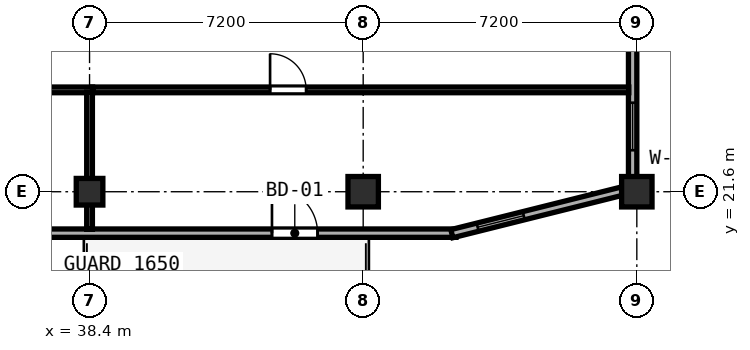
"""IFC4 building model, lengths in metres.
Left out: names, types, materials, properties, quantities, classifications, styles, units other than length and angle.
Written with IfcOpenShell. Run it as: python <this file> out.ifc"""

import sys

from ifc_helpers import new_model, si_unit, direction, frame, frame_2d, origin, origin_2d, place, context, subcontext, project, spatial, rectangle, hollow_rectangle, extrude, element, fill, save


model = new_model("IFC4")
c1 = context("Model", 3, precision=1e-05, world=origin(), true_north=direction((0.0, 1.0)))
c2 = subcontext(c1, "Body", "Model", "MODEL_VIEW")
j1 = project(units=[si_unit("LENGTHUNIT", "METRE"), si_unit("PLANEANGLEUNIT", "RADIAN")], contexts=[c1])
p1 = place(None, origin())
s1 = spatial("IfcSite", under=j1, at=p1, CompositionType="ELEMENT")
p2 = place(p1, origin())
s2 = spatial("IfcBuilding", under=s1, at=p2, CompositionType="ELEMENT")
p3 = place(p2, frame((0.0, 0.0, 269.85)))
s3 = spatial("IfcBuildingStorey", under=s2, at=p3, CompositionType="ELEMENT", Elevation=269.85)
for number, where, z_axis, x_axis in (
    (1, (52.8, 21.6, 0.0), (0.0, 0.0, 1.0), (1.0, 0.0, 0.0)),
    (2, (45.6, 21.6, 0.0), (0.0, 0.0, 1.0), (1.0, 0.0, 0.0)),
):
    element("IfcColumn", number, at=place(p3, frame(where, z_axis=z_axis, x_axis=x_axis)), inside=s3, PredefinedType="COLUMN", context=c2, shape_type="SweptSolid", body=[
        extrude(hollow_rectangle(XDim=0.8, YDim=0.8, WallThickness=0.03, at=origin_2d()), origin(), (0.0, 0.0, 1.0), 3.85),
    ])
p4 = place(p3, frame((38.4, 21.6, 0.0), z_axis=(0.0, 0.0, 1.0), x_axis=(1.0, 0.0, 0.0)))
e3 = element("IfcColumn", 3, at=p4, inside=s3, PredefinedType="COLUMN", context=c2, shape_type="SweptSolid", body=[
    extrude(hollow_rectangle(XDim=0.7, YDim=0.7, WallThickness=0.026, at=origin_2d()), origin(), (0.0, 0.0, 1.0), 3.85),
])
p5 = place(p3, frame((28.759, 20.51, 0.0), z_axis=(0.0, 0.0, 1.0), x_axis=(1.0, 0.0, 0.0)))
e4 = element("IfcWall", 4, at=p5, inside=s3, PredefinedType="SOLIDWALL", context=c2, shape_type="SweptSolid", body=[
    extrude(rectangle(XDim=19.283, YDim=0.22, at=frame_2d((9.642, 0.0))), origin(), (0.0, 0.0, 1.0), 3.67),
])
p6 = place(p5, frame((15.641, 0.0, 0.0), z_axis=(0.0, 0.0, 1.0), x_axis=(-1.0, 0.0, 0.0)))
e5 = element("IfcOpeningElement", 5, at=p6, cuts=e4, PredefinedType="OPENING", context=c2, shape_type="SweptSolid", body=[
    extrude(rectangle(XDim=1.2, YDim=2.15, at=frame_2d((0.6, 1.075))), frame((0.0, 0.12, 0.0), z_axis=(0.0, -1.0, 0.0), x_axis=(1.0, 0.0, 0.0)), (0.0, 0.0, 1.0), 0.24),
])
p7 = place(p3, frame((47.933, 20.497, 0.0), z_axis=(0.0, 0.0, 1.0), x_axis=(0.970133159038, 0.242572986408, 0.0)))
e6 = element("IfcWall", 6, at=p7, inside=s3, PredefinedType="SOLIDWALL", context=c2, shape_type="SweptSolid", body=[
    extrude(rectangle(XDim=4.613, YDim=0.22, at=frame_2d((2.306, 0.0))), origin(), (0.0, 0.0, 1.0), 3.315),
])
p8 = place(p7, frame((0.7, 0.0, 0.85)))
e7 = element("IfcOpeningElement", 7, at=p8, cuts=e6, PredefinedType="OPENING", context=c2, shape_type="SweptSolid", body=[
    extrude(rectangle(XDim=1.25, YDim=1.95, at=frame_2d((0.625, 0.975))), frame((0.0, 0.12, 0.0), z_axis=(0.0, -1.0, 0.0), x_axis=(1.0, 0.0, 0.0)), (0.0, 0.0, 1.0), 0.24),
])
p9 = place(p3, frame((52.69, 21.992, 0.0), z_axis=(0.0, 0.0, 1.0), x_axis=(0.0, 1.0, 0.0)))
e8 = element("IfcWall", 8, at=p9, inside=s3, PredefinedType="SOLIDWALL", context=c2, shape_type="SweptSolid", body=[
    extrude(rectangle(XDim=5.266, YDim=0.22, at=frame_2d((2.633, 0.0))), origin(), (0.0, 0.0, 1.0), 3.315),
])
p10 = place(p9, frame((0.7, 0.0, 0.85)))
e9 = element("IfcOpeningElement", 9, at=p10, cuts=e8, PredefinedType="OPENING", context=c2, shape_type="SweptSolid", body=[
    extrude(rectangle(XDim=1.25, YDim=1.95, at=frame_2d((0.625, 0.975))), frame((0.0, 0.12, 0.0), z_axis=(0.0, -1.0, 0.0), x_axis=(1.0, 0.0, 0.0)), (0.0, 0.0, 1.0), 0.24),
])
p11 = place(p3, frame((31.282, 24.28, 0.0), z_axis=(0.0, 0.0, 1.0), x_axis=(1.0, 0.0, 0.0)))
e10 = element("IfcWall", 10, at=p11, inside=s3, PredefinedType="PARTITIONING", context=c2, shape_type="SweptSolid", body=[
    extrude(rectangle(XDim=7.198, YDim=0.15, at=frame_2d((3.599, 0.0))), origin(), (0.0, 0.0, 1.0), 3.67),
])
p12 = place(p11, frame((3.913, 0.0, 0.0), z_axis=(0.0, 0.0, 1.0), x_axis=(-1.0, 0.0, 0.0)))
e11 = element("IfcOpeningElement", 11, at=p12, cuts=e10, PredefinedType="OPENING", context=c2, shape_type="SweptSolid", body=[
    extrude(rectangle(XDim=0.95, YDim=2.12, at=frame_2d((0.475, 1.06))), frame((0.0, 0.085, 0.0), z_axis=(0.0, -1.0, 0.0), x_axis=(1.0, 0.0, 0.0)), (0.0, 0.0, 1.0), 0.17),
])
p13 = place(p3, frame((38.4, 20.612, 0.0), z_axis=(0.0, 0.0, 1.0), x_axis=(0.0, 1.0, 0.0)))
e12 = element("IfcWall", 12, at=p13, inside=s3, PredefinedType="PARTITIONING", context=c2, shape_type="SweptSolid", body=[
    extrude(rectangle(XDim=3.608, YDim=0.15, at=frame_2d((1.804, 0.0))), origin(), (0.0, 0.0, 1.0), 3.155),
])
p14 = place(p3, frame((38.482, 24.28, 0.0), z_axis=(0.0, 0.0, 1.0), x_axis=(1.0, 0.0, 0.0)))
e13 = element("IfcWall", 13, at=p14, inside=s3, PredefinedType="PARTITIONING", context=c2, shape_type="SweptSolid", body=[
    extrude(rectangle(XDim=14.106, YDim=0.15, at=frame_2d((7.053, 0.0))), origin(), (0.0, 0.0, 1.0), 3.67),
])
p15 = place(p14, frame((5.618, 0.0, 0.0), z_axis=(0.0, 0.0, 1.0), x_axis=(-1.0, 0.0, 0.0)))
e14 = element("IfcOpeningElement", 14, at=p15, cuts=e13, PredefinedType="OPENING", context=c2, shape_type="SweptSolid", body=[
    extrude(rectangle(XDim=0.95, YDim=2.12, at=frame_2d((0.475, 1.06))), frame((0.0, 0.085, 0.0), z_axis=(0.0, -1.0, 0.0), x_axis=(1.0, 0.0, 0.0)), (0.0, 0.0, 1.0), 0.17),
])
p16 = place(p8, origin())
e15 = element("IfcWindow", 15, at=p16, inside=s3, PartitioningType="SINGLE_PANEL", PredefinedType="WINDOW", context=c2, shape_type="SweptSolid", body=[
    extrude(rectangle(XDim=1.25, YDim=1.95, at=frame_2d((0.625, 0.975))), frame((0.0, 0.03, 0.0), z_axis=(0.0, -1.0, 0.0), x_axis=(1.0, 0.0, 0.0)), (0.0, 0.0, 1.0), 0.06),
])
fill(e7, e15)
p17 = place(p10, origin())
e16 = element("IfcWindow", 16, at=p17, inside=s3, PartitioningType="SINGLE_PANEL", PredefinedType="WINDOW", context=c2, shape_type="SweptSolid", body=[
    extrude(rectangle(XDim=1.25, YDim=1.95, at=frame_2d((0.625, 0.975))), frame((0.0, 0.03, 0.0), z_axis=(0.0, -1.0, 0.0), x_axis=(1.0, 0.0, 0.0)), (0.0, 0.0, 1.0), 0.06),
])
fill(e9, e16)
p18 = place(p6, origin())
e17 = element("IfcDoor", 17, at=p18, inside=s3, OperationType="SINGLE_SWING_RIGHT", PredefinedType="DOOR", context=c2, shape_type="SweptSolid", body=[
    extrude(rectangle(XDim=1.2, YDim=2.15, at=frame_2d((0.6, 1.075))), frame((0.0, 0.025, 0.0), z_axis=(0.0, -1.0, 0.0), x_axis=(1.0, 0.0, 0.0)), (0.0, 0.0, 1.0), 0.05),
])
fill(e5, e17)
p19 = place(p15, origin())
e18 = element("IfcDoor", 18, at=p19, inside=s3, OperationType="SINGLE_SWING_RIGHT", PredefinedType="DOOR", context=c2, shape_type="SweptSolid", body=[
    extrude(rectangle(XDim=0.95, YDim=2.12, at=frame_2d((0.475, 1.06))), frame((0.0, 0.025, 0.0), z_axis=(0.0, -1.0, 0.0), x_axis=(1.0, 0.0, 0.0)), (0.0, 0.0, 1.0), 0.05),
])
fill(e14, e18)
save(model, sys.argv[1])
